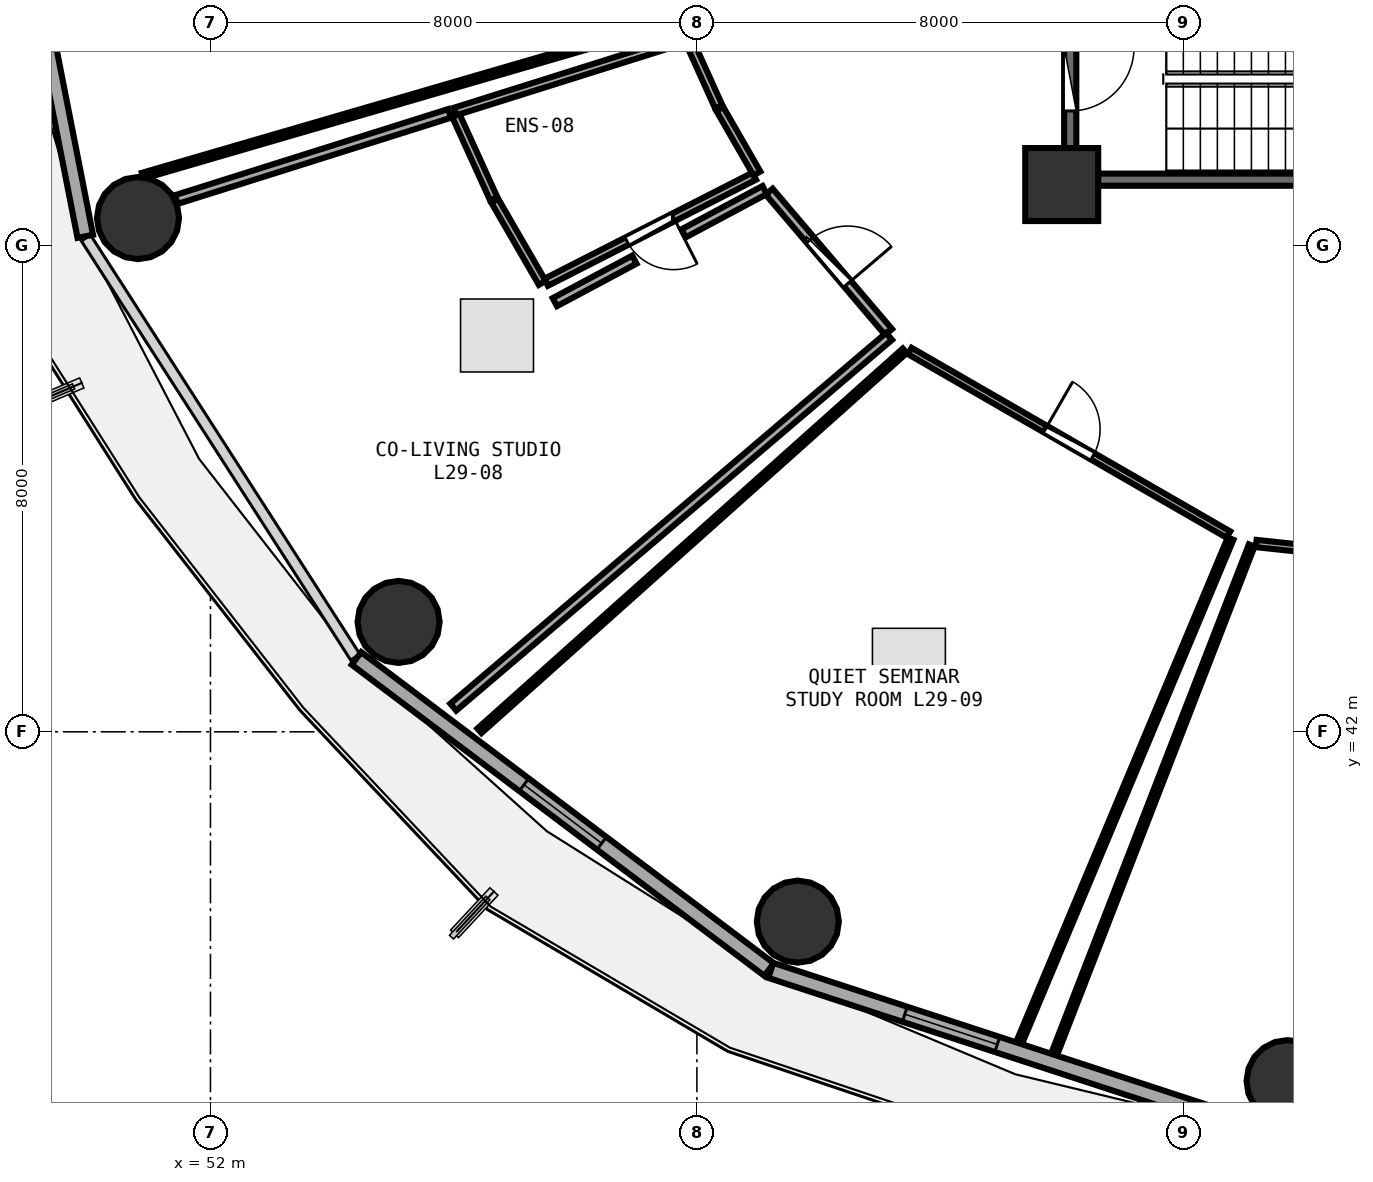
"""IFC4 building model, lengths in metres.
Left out: names, types, materials, properties, quantities, classifications, styles, units other than length and angle.
Written with IfcOpenShell. Run it as: python <this file> out.ifc"""

import sys

from ifc_helpers import new_model, si_unit, direction, frame, frame_2d, origin, origin_2d, place, context, subcontext, project, spatial, rectangle, circle, extrude, element, fill, save


model = new_model("IFC4")
c1 = context("Model", 3, precision=1e-05, world=origin(), true_north=direction((0.0, 1.0)))
c2 = subcontext(c1, "Body", "Model", "MODEL_VIEW")
j1 = project(units=[si_unit("LENGTHUNIT", "METRE"), si_unit("PLANEANGLEUNIT", "RADIAN")], contexts=[c1])
p1 = place(None, origin())
s1 = spatial("IfcSite", under=j1, at=p1, CompositionType="ELEMENT")
p2 = place(p1, origin())
s2 = spatial("IfcBuilding", under=s1, at=p2, CompositionType="ELEMENT")
p3 = place(p2, frame((0.0, 0.0, 113.85)))
s3 = spatial("IfcBuildingStorey", under=s2, at=p3, CompositionType="ELEMENT", Elevation=113.85)
p4 = place(p3, frame((66.0, 51.0, 0.0), z_axis=(0.0, 0.0, 1.0), x_axis=(1.0, 0.0, 0.0)))
e1 = element("IfcColumn", 1, at=p4, inside=s3, PredefinedType="PILASTER", context=c2, shape_type="SweptSolid", body=[
    extrude(rectangle(XDim=1.2, YDim=1.2, at=origin_2d()), origin(), (0.0, 0.0, 1.0), 3.75),
])
for number, where, z_axis, x_axis in (
    (2, (50.808, 50.448, 0.0), (0.0, 0.0, 1.0), (1.0, 0.0, 0.0)),
    (3, (55.094, 43.807, 0.0), (0.0, 0.0, 1.0), (1.0, 0.0, 0.0)),
    (4, (61.66, 38.878, 0.0), (0.0, 0.0, 1.0), (1.0, 0.0, 0.0)),
    (5, (69.714, 36.255, 0.0), (0.0, 0.0, 1.0), (1.0, 0.0, 0.0)),
):
    element("IfcColumn", number, at=place(p3, frame(where, z_axis=z_axis, x_axis=x_axis)), inside=s3, PredefinedType="COLUMN", context=c2, shape_type="SweptSolid", body=[
        extrude(circle(Radius=0.675, at=origin_2d()), origin(), (0.0, 0.0, 1.0), 3.75),
    ])
p5 = place(p3, frame((48.403, 57.985, 0.0), z_axis=(0.0, 0.0, 1.0), x_axis=(0.192581843632, -0.981280914674, 0.0)))
e6 = element("IfcWall", 6, at=p5, inside=s3, PredefinedType="SOLIDWALL", context=c2, shape_type="SweptSolid", body=[
    extrude(rectangle(XDim=7.987, YDim=0.26, at=frame_2d((3.993, 0.0))), origin(), (0.0, 0.0, 1.0), 3.475),
])
p6 = place(p5, frame((3.193, 0.0, 0.85)))
e7 = element("IfcOpeningElement", 7, at=p6, cuts=e6, PredefinedType="OPENING", context=c2, shape_type="SweptSolid", body=[
    extrude(rectangle(XDim=1.6, YDim=1.45, at=frame_2d((0.8, 0.725))), frame((0.0, 0.14, 0.0), z_axis=(0.0, -1.0, 0.0), x_axis=(1.0, 0.0, 0.0)), (0.0, 0.0, 1.0), 0.28),
])
p7 = place(p3, frame((54.401, 43.207, 0.0), z_axis=(0.0, 0.0, 1.0), x_axis=(0.798501507879, -0.601992808857, 0.0)))
e8 = element("IfcWall", 8, at=p7, inside=s3, PredefinedType="SOLIDWALL", context=c2, shape_type="SweptSolid", body=[
    extrude(rectangle(XDim=8.499, YDim=0.26, at=frame_2d((4.25, 0.0))), origin(), (0.0, 0.0, 1.0), 3.475),
])
p8 = place(p7, frame((3.45, 0.0, 0.85)))
e9 = element("IfcOpeningElement", 9, at=p8, cuts=e8, PredefinedType="OPENING", context=c2, shape_type="SweptSolid", body=[
    extrude(rectangle(XDim=1.6, YDim=1.45, at=frame_2d((0.8, 0.725))), frame((0.0, 0.14, 0.0), z_axis=(0.0, -1.0, 0.0), x_axis=(1.0, 0.0, 0.0)), (0.0, 0.0, 1.0), 0.28),
])
p9 = place(p3, frame((61.214, 38.077, 0.0), z_axis=(0.0, 0.0, 1.0), x_axis=(0.950471101963, -0.310812941064, 0.0)))
e10 = element("IfcWall", 10, at=p9, inside=s3, PredefinedType="SOLIDWALL", context=c2, shape_type="SweptSolid", body=[
    extrude(rectangle(XDim=8.76, YDim=0.26, at=frame_2d((4.38, 0.0))), origin(), (0.0, 0.0, 1.0), 3.475),
])
p10 = place(p9, frame((2.32, 0.0, 0.85)))
e11 = element("IfcOpeningElement", 11, at=p10, cuts=e10, PredefinedType="OPENING", context=c2, shape_type="SweptSolid", body=[
    extrude(rectangle(XDim=1.6, YDim=1.45, at=frame_2d((0.8, 0.725))), frame((0.0, 0.14, 0.0), z_axis=(0.0, -1.0, 0.0), x_axis=(1.0, 0.0, 0.0)), (0.0, 0.0, 1.0), 0.28),
])
p11 = place(p3, frame((66.26, 51.08, 0.0), z_axis=(0.0, 0.0, 1.0), x_axis=(1.0, 0.0, 0.0)))
e12 = element("IfcWall", 12, at=p11, inside=s3, PredefinedType="SHEAR", context=c2, shape_type="SweptSolid", body=[
    extrude(rectangle(XDim=7.16, YDim=0.2, at=frame_2d((3.58, 0.0))), origin(), (0.0, 0.0, 1.0), 3.49),
])
p12 = place(p3, frame((66.14, 54.27, 0.0), z_axis=(0.0, 0.0, 1.0), x_axis=(0.0, -1.0, 0.0)))
e13 = element("IfcWall", 13, at=p12, inside=s3, PredefinedType="SHEAR", context=c2, shape_type="SweptSolid", body=[
    extrude(rectangle(XDim=3.07, YDim=0.2, at=frame_2d((1.535, 0.0))), origin(), (0.0, 0.0, 1.0), 3.49),
])
p13 = place(p12, frame((1.01, 0.0, 0.0)))
e14 = element("IfcOpeningElement", 14, at=p13, cuts=e13, PredefinedType="OPENING", context=c2, shape_type="SweptSolid", body=[
    extrude(rectangle(XDim=1.05, YDim=2.1, at=frame_2d((0.525, 1.05))), frame((0.0, 0.11, 0.0), z_axis=(0.0, -1.0, 0.0), x_axis=(1.0, 0.0, 0.0)), (0.0, 0.0, 1.0), 0.22),
])
p14 = place(p3, frame((60.944, 51.138, 0.0), z_axis=(0.0, 0.0, 1.0), x_axis=(-0.890879426821, -0.454239856097, 0.0)))
e15 = element("IfcWall", 15, at=p14, inside=s3, PredefinedType="PLUMBINGWALL", context=c2, shape_type="SweptSolid", body=[
    extrude(rectangle(XDim=3.842, YDim=0.13, at=frame_2d((1.921, 0.0))), origin(), (0.0, 0.0, 1.0), 2.925),
])
p15 = place(p14, frame((1.491, 0.0, 0.0)))
e16 = element("IfcOpeningElement", 16, at=p15, cuts=e15, PredefinedType="OPENING", context=c2, shape_type="SweptSolid", body=[
    extrude(rectangle(XDim=0.86, YDim=2.05, at=frame_2d((0.43, 1.025))), frame((0.0, 0.075, 0.0), z_axis=(0.0, -1.0, 0.0), x_axis=(1.0, 0.0, 0.0)), (0.0, 0.0, 1.0), 0.15),
])
p16 = place(p3, frame((61.189, 50.883, 0.0), z_axis=(0.0, 0.0, 1.0), x_axis=(0.647807427381, -0.761804132983, 0.0)))
e17 = element("IfcWall", 17, at=p16, inside=s3, PredefinedType="PARTITIONING", context=c2, shape_type="SweptSolid", body=[
    extrude(rectangle(XDim=3.031, YDim=0.15, at=frame_2d((1.515, 0.0))), origin(), (0.0, 0.0, 1.0), 2.925),
])
p17 = place(p16, frame((1.04, 0.0, 0.0)))
e18 = element("IfcOpeningElement", 18, at=p17, cuts=e17, PredefinedType="OPENING", context=c2, shape_type="SweptSolid", body=[
    extrude(rectangle(XDim=0.95, YDim=2.08, at=frame_2d((0.475, 1.04))), frame((0.0, 0.085, 0.0), z_axis=(0.0, -1.0, 0.0), x_axis=(1.0, 0.0, 0.0)), (0.0, 0.0, 1.0), 0.17),
])
p18 = place(p3, frame((63.501, 48.263, 0.0), z_axis=(0.0, 0.0, 1.0), x_axis=(0.866473771155, -0.499222599548, 0.0)))
e19 = element("IfcWall", 19, at=p18, inside=s3, PredefinedType="PARTITIONING", context=c2, shape_type="SweptSolid", body=[
    extrude(rectangle(XDim=6.048, YDim=0.12, at=frame_2d((3.024, 0.0))), origin(), (0.0, 0.0, 1.0), 2.925),
])
p19 = place(p18, frame((2.574, 0.0, 0.0)))
e20 = element("IfcOpeningElement", 20, at=p19, cuts=e19, PredefinedType="OPENING", context=c2, shape_type="SweptSolid", body=[
    extrude(rectangle(XDim=0.9, YDim=2.08, at=frame_2d((0.45, 1.04))), frame((0.0, 0.07, 0.0), z_axis=(0.0, -1.0, 0.0), x_axis=(1.0, 0.0, 0.0)), (0.0, 0.0, 1.0), 0.14),
])
p20 = place(p3, frame((69.199, 45.097, 0.0), z_axis=(0.0, 0.0, 1.0), x_axis=(0.994336816939, -0.10627461823, 0.0)))
e21 = element("IfcWall", 21, at=p20, inside=s3, PredefinedType="PARTITIONING", context=c2, shape_type="SweptSolid", body=[
    extrude(rectangle(XDim=6.203, YDim=0.12, at=frame_2d((3.101, 0.0))), origin(), (0.0, 0.0, 1.0), 3.48),
])
p21 = place(p20, frame((2.651, 0.0, 0.0)))
e22 = element("IfcOpeningElement", 22, at=p21, cuts=e21, PredefinedType="OPENING", context=c2, shape_type="SweptSolid", body=[
    extrude(rectangle(XDim=0.9, YDim=2.08, at=frame_2d((0.45, 1.04))), frame((0.0, 0.07, 0.0), z_axis=(0.0, -1.0, 0.0), x_axis=(1.0, 0.0, 0.0)), (0.0, 0.0, 1.0), 0.14),
])
p22 = place(p3, frame((59.692, 53.709, 0.0), z_axis=(0.0, 0.0, 1.0), x_axis=(-0.960114392492, -0.279607498701, 0.0)))
e23 = element("IfcWall", 23, at=p22, inside=s3, PredefinedType="PARTITIONING", context=c2, shape_type="SweptSolid", body=[
    extrude(rectangle(XDim=9.173, YDim=0.1, at=frame_2d((4.586, 0.0))), origin(), (0.0, 0.0, 1.0), 2.975),
])
p23 = place(p3, frame((59.858, 53.387, 0.0), z_axis=(0.0, 0.0, 1.0), x_axis=(0.412001110445, -0.911183343237, 0.0)))
e24 = element("IfcWall", 24, at=p23, inside=s3, PredefinedType="PLUMBINGWALL", context=c2, shape_type="SweptSolid", body=[
    extrude(rectangle(XDim=1.215, YDim=0.13, at=frame_2d((0.608, 0.0))), origin(), (0.0, 0.0, 1.0), 3.235),
])
p24 = place(p3, frame((60.377, 52.244, 0.0), z_axis=(0.0, 0.0, 1.0), x_axis=(0.49839243415, -0.866951545118, 0.0)))
e25 = element("IfcWall", 25, at=p24, inside=s3, PredefinedType="PLUMBINGWALL", context=c2, shape_type="SweptSolid", body=[
    extrude(rectangle(XDim=1.224, YDim=0.13, at=frame_2d((0.612, 0.0))), origin(), (0.0, 0.0, 1.0), 3.48),
])
p25 = place(p3, frame((57.457, 49.382, 0.0), z_axis=(0.0, 0.0, 1.0), x_axis=(-0.500666062801, 0.865640510581, 0.0)))
e26 = element("IfcWall", 26, at=p25, inside=s3, PredefinedType="PLUMBINGWALL", context=c2, shape_type="SweptSolid", body=[
    extrude(rectangle(XDim=1.56, YDim=0.13, at=frame_2d((0.78, 0.0))), origin(), (0.0, 0.0, 1.0), 2.925),
])
p26 = place(p3, frame((56.658, 50.768, 0.0), z_axis=(0.0, 0.0, 1.0), x_axis=(-0.414183029379, 0.910193615762, 0.0)))
e27 = element("IfcWall", 27, at=p26, inside=s3, PredefinedType="PLUMBINGWALL", context=c2, shape_type="SweptSolid", body=[
    extrude(rectangle(XDim=1.549, YDim=0.13, at=frame_2d((0.774, 0.0))), origin(), (0.0, 0.0, 1.0), 2.925),
])
p27 = place(p3, frame((56.027, 52.202, 0.0), z_axis=(0.0, 0.0, 1.0), x_axis=(0.953881070773, 0.30018478113, 0.0)))
e28 = element("IfcWall", 28, at=p27, inside=s3, PredefinedType="PLUMBINGWALL", context=c2, shape_type="SweptSolid", body=[
    extrude(rectangle(XDim=3.988, YDim=0.13, at=frame_2d((1.994, 0.0))), origin(), (0.0, 0.0, 1.0), 3.175),
])
p28 = place(p3, frame((63.16, 48.503, 0.0), z_axis=(0.0, 0.0, 1.0), x_axis=(-0.761665255774, -0.647970707784, 0.0)))
e29 = element("IfcWall", 29, at=p28, inside=s3, PredefinedType="PARTITIONING", context=c2, shape_type="SweptSolid", body=[
    extrude(rectangle(XDim=9.41, YDim=0.15, at=frame_2d((4.705, 0.0))), origin(), (0.0, 0.0, 1.0), 2.975),
])
p29 = place(p3, frame((51.438, 50.753, 0.0), z_axis=(0.0, 0.0, 1.0), x_axis=(0.953736790079, 0.300642869946, 0.0)))
e30 = element("IfcWall", 30, at=p29, inside=s3, PredefinedType="PARTITIONING", context=c2, shape_type="SweptSolid", body=[
    extrude(rectangle(XDim=4.712, YDim=0.15, at=frame_2d((2.356, 0.0))), origin(), (0.0, 0.0, 1.0), 3.235),
])
p30 = place(p3, frame((57.663, 49.066, 0.0), z_axis=(0.0, 0.0, 1.0), x_axis=(0.881978876335, 0.471288936533, 0.0)))
e31 = element("IfcWall", 31, at=p30, inside=s3, PredefinedType="PARTITIONING", context=c2, shape_type="SweptSolid", body=[
    extrude(rectangle(XDim=1.483, YDim=0.15, at=frame_2d((0.741, 0.0))), origin(), (0.0, 0.0, 1.0), 3.175),
])
p31 = place(p3, frame((59.782, 50.198, 0.0), z_axis=(0.0, 0.0, 1.0), x_axis=(0.88197684433, 0.471292739246, 0.0)))
e32 = element("IfcWall", 32, at=p31, inside=s3, PredefinedType="PARTITIONING", context=c2, shape_type="SweptSolid", body=[
    extrude(rectangle(XDim=1.51, YDim=0.15, at=frame_2d((0.755, 0.0))), origin(), (0.0, 0.0, 1.0), 2.925),
])
p32 = place(p3, frame((68.778, 45.177, 0.0), z_axis=(0.0, 0.0, 1.0), x_axis=(-0.386794233591, -0.922166048421, 0.0)))
e33 = element("IfcWall", 33, at=p32, inside=s3, PredefinedType="PARTITIONING", context=c2, shape_type="SweptSolid", body=[
    extrude(rectangle(XDim=8.923, YDim=0.1, at=frame_2d((4.461, 0.0))), origin(), (0.0, 0.0, 1.0), 2.925),
])
p33 = place(p3, frame((56.424, 42.017, 0.0), z_axis=(0.0, 0.0, 1.0), x_axis=(0.745731207234, 0.666246926115, 0.0)))
e34 = element("IfcWall", 34, at=p33, inside=s3, PredefinedType="PARTITIONING", context=c2, shape_type="SweptSolid", body=[
    extrude(rectangle(XDim=9.381, YDim=0.1, at=frame_2d((4.69, 0.0))), origin(), (0.0, 0.0, 1.0), 2.975),
])
p34 = place(p3, frame((65.903, 36.765, 0.0), z_axis=(0.0, 0.0, 1.0), x_axis=(0.361863971294, 0.932230908241, 0.0)))
e35 = element("IfcWall", 35, at=p34, inside=s3, PredefinedType="PARTITIONING", context=c2, shape_type="SweptSolid", body=[
    extrude(rectangle(XDim=8.904, YDim=0.1, at=frame_2d((4.452, 0.0))), origin(), (0.0, 0.0, 1.0), 2.925),
])
p35 = place(p8, origin())
e36 = element("IfcWindow", 36, at=p35, inside=s3, PartitioningType="SINGLE_PANEL", PredefinedType="WINDOW", context=c2, shape_type="SweptSolid", body=[
    extrude(rectangle(XDim=1.6, YDim=1.45, at=frame_2d((0.8, 0.725))), frame((0.0, 0.03, 0.0), z_axis=(0.0, -1.0, 0.0), x_axis=(1.0, 0.0, 0.0)), (0.0, 0.0, 1.0), 0.06),
])
fill(e9, e36)
p36 = place(p10, origin())
e37 = element("IfcWindow", 37, at=p36, inside=s3, PartitioningType="SINGLE_PANEL", PredefinedType="WINDOW", context=c2, shape_type="SweptSolid", body=[
    extrude(rectangle(XDim=1.6, YDim=1.45, at=frame_2d((0.8, 0.725))), frame((0.0, 0.03, 0.0), z_axis=(0.0, -1.0, 0.0), x_axis=(1.0, 0.0, 0.0)), (0.0, 0.0, 1.0), 0.06),
])
fill(e11, e37)
p37 = place(p13, origin())
e38 = element("IfcDoor", 38, at=p37, inside=s3, OperationType="SINGLE_SWING_LEFT", PredefinedType="DOOR", context=c2, shape_type="SweptSolid", body=[
    extrude(rectangle(XDim=1.05, YDim=2.1, at=frame_2d((0.525, 1.05))), frame((0.0, 0.025, 0.0), z_axis=(0.0, -1.0, 0.0), x_axis=(1.0, 0.0, 0.0)), (0.0, 0.0, 1.0), 0.05),
])
fill(e14, e38)
p38 = place(p15, origin())
e39 = element("IfcDoor", 39, at=p38, inside=s3, OperationType="SINGLE_SWING_LEFT", PredefinedType="DOOR", context=c2, shape_type="SweptSolid", body=[
    extrude(rectangle(XDim=0.86, YDim=2.05, at=frame_2d((0.43, 1.025))), frame((0.0, 0.025, 0.0), z_axis=(0.0, -1.0, 0.0), x_axis=(1.0, 0.0, 0.0)), (0.0, 0.0, 1.0), 0.05),
])
fill(e16, e39)
p39 = place(p17, origin())
e40 = element("IfcDoor", 40, at=p39, inside=s3, OperationType="SINGLE_SWING_RIGHT", PredefinedType="DOOR", context=c2, shape_type="SweptSolid", body=[
    extrude(rectangle(XDim=0.95, YDim=2.08, at=frame_2d((0.475, 1.04))), frame((0.0, 0.025, 0.0), z_axis=(0.0, -1.0, 0.0), x_axis=(1.0, 0.0, 0.0)), (0.0, 0.0, 1.0), 0.05),
])
fill(e18, e40)
p40 = place(p19, origin())
e41 = element("IfcDoor", 41, at=p40, inside=s3, OperationType="SINGLE_SWING_LEFT", PredefinedType="DOOR", context=c2, shape_type="SweptSolid", body=[
    extrude(rectangle(XDim=0.9, YDim=2.08, at=frame_2d((0.45, 1.04))), frame((0.0, 0.025, 0.0), z_axis=(0.0, -1.0, 0.0), x_axis=(1.0, 0.0, 0.0)), (0.0, 0.0, 1.0), 0.05),
])
fill(e20, e41)
save(model, sys.argv[1])
